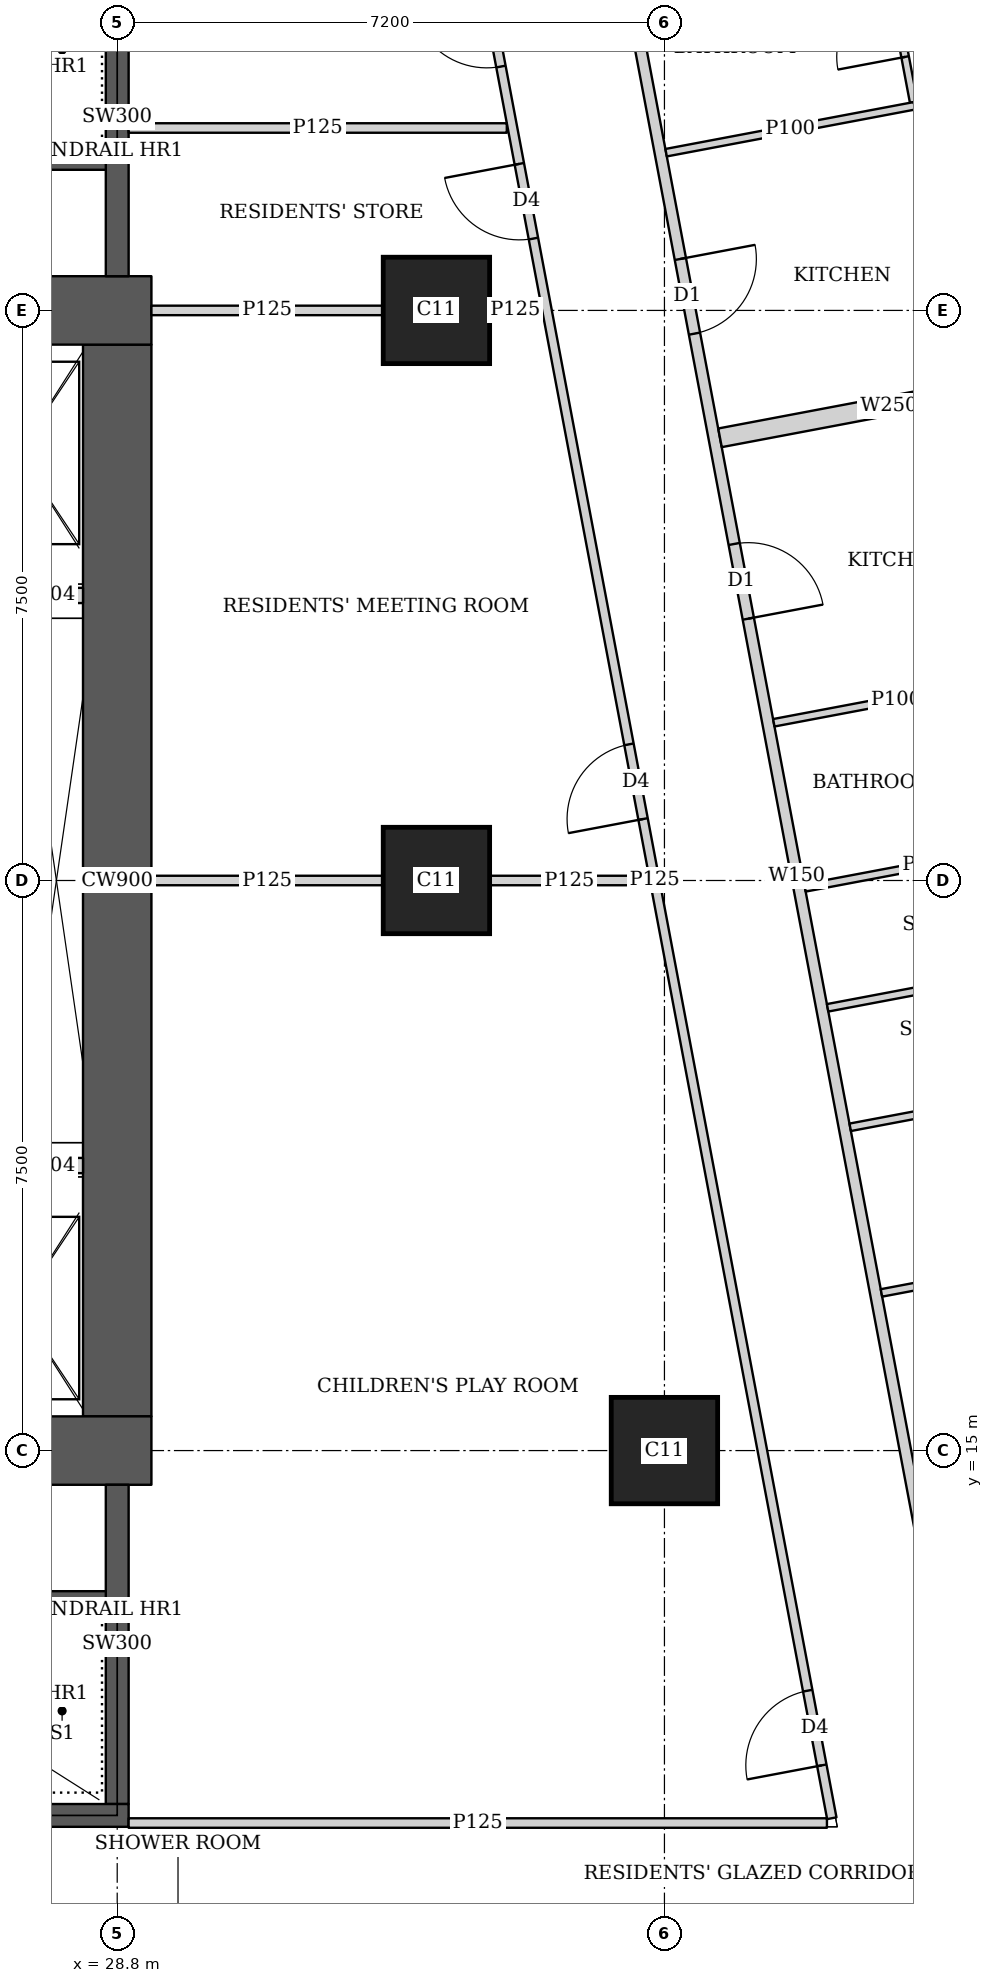
"""IFC4 building model, lengths in metres.
Left out: names, types, materials, properties, quantities, classifications, styles, units other than length and angle.
Written with IfcOpenShell. Run it as: python <this file> out.ifc"""

import sys

from ifc_helpers import new_model, si_unit, direction, frame, frame_2d, origin, origin_2d, place, context, subcontext, project, spatial, rectangle, extrude, element, fill, save


model = new_model("IFC4")
c1 = context("Model", 3, precision=1e-05, world=origin(), true_north=direction((0.0, 1.0)))
c2 = subcontext(c1, "Body", "Model", "MODEL_VIEW")
j1 = project(units=[si_unit("LENGTHUNIT", "METRE"), si_unit("PLANEANGLEUNIT", "RADIAN")], contexts=[c1])
p1 = place(None, origin())
s1 = spatial("IfcSite", under=j1, at=p1, CompositionType="ELEMENT")
p2 = place(p1, origin())
s2 = spatial("IfcBuilding", under=s1, at=p2, CompositionType="ELEMENT")
p3 = place(p2, frame((0.0, 0.0, 242.45)))
s3 = spatial("IfcBuildingStorey", under=s2, at=p3, CompositionType="ELEMENT", Elevation=242.45)
for number, where, z_axis, x_axis in (
    (1, (36.0, 15.0, 0.0), (0.0, 0.0, 1.0), (1.0, 0.0, 0.0)),
    (2, (33.0, 22.5, 0.0), (0.0, 0.0, 1.0), (1.0, 0.0, 0.0)),
    (3, (33.0, 30.0, 0.0), (0.0, 0.0, 1.0), (1.0, 0.0, 0.0)),
):
    element("IfcColumn", number, at=place(p3, frame(where, z_axis=z_axis, x_axis=x_axis)), inside=s3, PredefinedType="COLUMN", context=c2, shape_type="SweptSolid", body=[
        extrude(rectangle(XDim=1.4, YDim=1.4, at=origin_2d()), origin(), (0.0, 0.0, 1.0), 3.75),
    ])
p4 = place(p3, frame((13.95, 15.0, 0.0), z_axis=(0.0, 0.0, 1.0), x_axis=(1.0, 0.0, 0.0)))
e4 = element("IfcWall", 4, at=p4, inside=s3, PredefinedType="SHEAR", context=c2, shape_type="SweptSolid", body=[
    extrude(rectangle(XDim=15.3, YDim=0.9, at=frame_2d((7.65, 0.0))), origin(), (0.0, 0.0, 1.0), 3.75),
])
p5 = place(p4, frame((4.45, 0.0, 0.0)))
e5 = element("IfcOpeningElement", 5, at=p5, cuts=e4, PredefinedType="OPENING", context=c2, shape_type="SweptSolid", body=[
    extrude(rectangle(XDim=1.8, YDim=2.1, at=frame_2d((0.9, 1.05))), frame((0.0, 0.46, 0.0), z_axis=(0.0, -1.0, 0.0), x_axis=(1.0, 0.0, 0.0)), (0.0, 0.0, 1.0), 0.92),
])
p6 = place(p4, frame((10.7, 0.0, 0.0)))
e6 = element("IfcOpeningElement", 6, at=p6, cuts=e4, PredefinedType="OPENING", context=c2, shape_type="SweptSolid", body=[
    extrude(rectangle(XDim=1.1, YDim=2.1, at=frame_2d((0.55, 1.05))), frame((0.0, 0.46, 0.0), z_axis=(0.0, -1.0, 0.0), x_axis=(1.0, 0.0, 0.0)), (0.0, 0.0, 1.0), 0.92),
])
p7 = place(p3, frame((13.95, 30.0, 0.0), z_axis=(0.0, 0.0, 1.0), x_axis=(1.0, 0.0, 0.0)))
e7 = element("IfcWall", 7, at=p7, inside=s3, PredefinedType="SHEAR", context=c2, shape_type="SweptSolid", body=[
    extrude(rectangle(XDim=15.3, YDim=0.9, at=frame_2d((7.65, 0.0))), origin(), (0.0, 0.0, 1.0), 3.75),
])
p8 = place(p7, frame((4.45, 0.0, 0.0)))
e8 = element("IfcOpeningElement", 8, at=p8, cuts=e7, PredefinedType="OPENING", context=c2, shape_type="SweptSolid", body=[
    extrude(rectangle(XDim=1.8, YDim=2.1, at=frame_2d((0.9, 1.05))), frame((0.0, 0.46, 0.0), z_axis=(0.0, -1.0, 0.0), x_axis=(1.0, 0.0, 0.0)), (0.0, 0.0, 1.0), 0.92),
])
p9 = place(p7, frame((10.7, 0.0, 0.0)))
e9 = element("IfcOpeningElement", 9, at=p9, cuts=e7, PredefinedType="OPENING", context=c2, shape_type="SweptSolid", body=[
    extrude(rectangle(XDim=1.1, YDim=2.1, at=frame_2d((0.55, 1.05))), frame((0.0, 0.46, 0.0), z_axis=(0.0, -1.0, 0.0), x_axis=(1.0, 0.0, 0.0)), (0.0, 0.0, 1.0), 0.92),
])
p10 = place(p3, frame((28.8, 15.45, 0.0), z_axis=(0.0, 0.0, 1.0), x_axis=(0.0, 1.0, 0.0)))
e10 = element("IfcWall", 10, at=p10, inside=s3, PredefinedType="SHEAR", context=c2, shape_type="SweptSolid", body=[
    extrude(rectangle(XDim=14.1, YDim=0.9, at=frame_2d((7.05, 0.0))), origin(), (0.0, 0.0, 1.0), 3.75),
])
p11 = place(p3, frame((21.45, 10.2, 0.0), z_axis=(0.0, 0.0, 1.0), x_axis=(1.0, 0.0, 0.0)))
e11 = element("IfcWall", 11, at=p11, inside=s3, PredefinedType="SHEAR", context=c2, shape_type="SweptSolid", body=[
    extrude(rectangle(XDim=7.5, YDim=0.3, at=frame_2d((3.75, 0.0))), origin(), (0.0, 0.0, 1.0), 3.75),
])
p12 = place(p11, frame((0.5, 0.0, 0.0)))
e12 = element("IfcOpeningElement", 12, at=p12, cuts=e11, PredefinedType="OPENING", context=c2, shape_type="SweptSolid", body=[
    extrude(rectangle(XDim=1.1, YDim=2.1, at=frame_2d((0.55, 1.05))), frame((0.0, 0.16, 0.0), z_axis=(0.0, -1.0, 0.0), x_axis=(1.0, 0.0, 0.0)), (0.0, 0.0, 1.0), 0.32),
])
for number, where, z_axis, x_axis in (
    (13, (28.8, 10.35, 0.0), (0.0, 0.0, 1.0), (0.0, 1.0, 0.0)),
    (14, (28.8, 30.45, 0.0), (0.0, 0.0, 1.0), (0.0, 1.0, 0.0)),
):
    element("IfcWall", number, at=place(p3, frame(where, z_axis=z_axis, x_axis=x_axis)), inside=s3, PredefinedType="SHEAR", context=c2, shape_type="SweptSolid", body=[
        extrude(rectangle(XDim=4.2, YDim=0.3, at=frame_2d((2.1, 0.0))), origin(), (0.0, 0.0, 1.0), 3.75),
    ])
p13 = place(p3, frame((33.933, 42.73, 0.0), z_axis=(0.0, 0.0, 1.0), x_axis=(0.185595417643, -0.982626246825, 0.0)))
e15 = element("IfcWall", 15, at=p13, inside=s3, PredefinedType="SOLIDWALL", context=c2, shape_type="SweptSolid", body=[
    extrude(rectangle(XDim=41.051, YDim=0.15, at=frame_2d((20.525, 0.0))), origin(), (0.0, 0.0, 1.0), 2.45),
])
p14 = place(p13, frame((12.266, 0.0, 0.0)))
e16 = element("IfcOpeningElement", 16, at=p14, cuts=e15, PredefinedType="OPENING", context=c2, shape_type="SweptSolid", body=[
    extrude(rectangle(XDim=1.0, YDim=2.1, at=frame_2d((0.5, 1.05))), frame((0.0, 0.085, 0.0), z_axis=(0.0, -1.0, 0.0), x_axis=(1.0, 0.0, 0.0)), (0.0, 0.0, 1.0), 0.17),
])
p15 = place(p13, frame((16.082, 0.0, 0.0)))
e17 = element("IfcOpeningElement", 17, at=p15, cuts=e15, PredefinedType="OPENING", context=c2, shape_type="SweptSolid", body=[
    extrude(rectangle(XDim=1.0, YDim=2.1, at=frame_2d((0.5, 1.05))), frame((0.0, 0.085, 0.0), z_axis=(0.0, -1.0, 0.0), x_axis=(1.0, 0.0, 0.0)), (0.0, 0.0, 1.0), 0.17),
])
p16 = place(p13, frame((30.862, 0.0, 0.0)))
e18 = element("IfcOpeningElement", 18, at=p16, cuts=e15, PredefinedType="OPENING", context=c2, shape_type="SweptSolid", body=[
    extrude(rectangle(XDim=1.0, YDim=2.1, at=frame_2d((0.5, 1.05))), frame((0.0, 0.085, 0.0), z_axis=(0.0, -1.0, 0.0), x_axis=(1.0, 0.0, 0.0)), (0.0, 0.0, 1.0), 0.17),
])
p17 = place(p3, frame((38.764, 41.941, 0.0), z_axis=(0.0, 0.0, 1.0), x_axis=(0.185548572312, -0.982635093671, 0.0)))
e19 = element("IfcWall", 19, at=p17, inside=s3, PredefinedType="PARTITIONING", context=c2, shape_type="SweptSolid", body=[
    extrude(rectangle(XDim=9.135, YDim=0.1, at=frame_2d((4.568, 0.0))), origin(), (0.0, 0.0, 1.0), 3.45),
])
p18 = place(p17, frame((8.085, 0.0, 0.0)))
e20 = element("IfcOpeningElement", 20, at=p18, cuts=e19, PredefinedType="OPENING", context=c2, shape_type="SweptSolid", body=[
    extrude(rectangle(XDim=0.9, YDim=2.1, at=frame_2d((0.45, 1.05))), frame((0.0, 0.06, 0.0), z_axis=(0.0, -1.0, 0.0), x_axis=(1.0, 0.0, 0.0)), (0.0, 0.0, 1.0), 0.12),
])
p19 = place(p17, frame((3.7, 0.0, 0.0)))
e21 = element("IfcOpeningElement", 21, at=p19, cuts=e19, PredefinedType="OPENING", context=c2, shape_type="SweptSolid", body=[
    extrude(rectangle(XDim=0.9, YDim=2.1, at=frame_2d((0.45, 1.05))), frame((0.0, 0.06, 0.0), z_axis=(0.0, -1.0, 0.0), x_axis=(1.0, 0.0, 0.0)), (0.0, 0.0, 1.0), 0.12),
])
p20 = place(p3, frame((37.473, 42.309, 0.0), z_axis=(0.0, 0.0, 1.0), x_axis=(0.185491912953, -0.982645790827, 0.0)))
e22 = element("IfcWall", 22, at=p20, inside=s3, PredefinedType="PARTITIONING", context=c2, shape_type="SweptSolid", body=[
    extrude(rectangle(XDim=9.737, YDim=0.1, at=frame_2d((4.869, 0.0))), origin(), (0.0, 0.0, 1.0), 3.45),
])
p21 = place(p20, frame((8.232, 0.0, 0.0)))
e23 = element("IfcOpeningElement", 23, at=p21, cuts=e22, PredefinedType="OPENING", context=c2, shape_type="SweptSolid", body=[
    extrude(rectangle(XDim=0.9, YDim=2.1, at=frame_2d((0.45, 1.05))), frame((0.0, 0.06, 0.0), z_axis=(0.0, -1.0, 0.0), x_axis=(1.0, 0.0, 0.0)), (0.0, 0.0, 1.0), 0.12),
])
p22 = place(p20, frame((2.853, 0.0, 0.0)))
e24 = element("IfcOpeningElement", 24, at=p22, cuts=e22, PredefinedType="OPENING", context=c2, shape_type="SweptSolid", body=[
    extrude(rectangle(XDim=0.9, YDim=2.1, at=frame_2d((0.45, 1.05))), frame((0.0, 0.06, 0.0), z_axis=(0.0, -1.0, 0.0), x_axis=(1.0, 0.0, 0.0)), (0.0, 0.0, 1.0), 0.12),
])
p23 = place(p20, frame((5.564, 0.0, 0.0)))
e25 = element("IfcOpeningElement", 25, at=p23, cuts=e22, PredefinedType="OPENING", context=c2, shape_type="SweptSolid", body=[
    extrude(rectangle(XDim=0.9, YDim=2.1, at=frame_2d((0.45, 1.05))), frame((0.0, 0.06, 0.0), z_axis=(0.0, -1.0, 0.0), x_axis=(1.0, 0.0, 0.0)), (0.0, 0.0, 1.0), 0.12),
])
p24 = place(p3, frame((39.289, 32.692, 0.0), z_axis=(0.0, 0.0, 1.0), x_axis=(-0.982633623707, -0.185556356831, 0.0)))
e26 = element("IfcWall", 26, at=p24, inside=s3, PredefinedType="PARTITIONING", context=c2, shape_type="SweptSolid", body=[
    extrude(rectangle(XDim=3.325, YDim=0.1, at=frame_2d((1.663, 0.0))), origin(), (0.0, 0.0, 1.0), 3.45),
])
for number, where, z_axis, x_axis in (
    (27, (40.657, 25.183, 0.0), (0.0, 0.0, 1.0), (-0.983, -0.186, 0.0)),
    (28, (41.365, 21.433, 0.0), (0.0, 0.0, 1.0), (-0.983, -0.186, 0.0)),
):
    element("IfcWall", number, at=place(p3, frame(where, z_axis=z_axis, x_axis=x_axis)), inside=s3, PredefinedType="PARTITIONING", context=c2, shape_type="SweptSolid", body=[
        extrude(rectangle(XDim=3.275, YDim=0.1, at=frame_2d((1.637, 0.0))), origin(), (0.0, 0.0, 1.0), 3.45),
    ])
p25 = place(p3, frame((42.073, 17.682, 0.0), z_axis=(0.0, 0.0, 1.0), x_axis=(-0.982620626894, -0.185625169636, 0.0)))
e29 = element("IfcWall", 29, at=p25, inside=s3, PredefinedType="PARTITIONING", context=c2, shape_type="SweptSolid", body=[
    extrude(rectangle(XDim=3.275, YDim=0.1, at=frame_2d((1.637, 0.0))), origin(), (0.0, 0.0, 1.0), 3.45),
])
p26 = place(p25, frame((1.2, 0.0, 0.0)))
e30 = element("IfcOpeningElement", 30, at=p26, cuts=e29, PredefinedType="OPENING", context=c2, shape_type="SweptSolid", body=[
    extrude(rectangle(XDim=0.9, YDim=2.1, at=frame_2d((0.45, 1.05))), frame((0.0, 0.06, 0.0), z_axis=(0.0, -1.0, 0.0), x_axis=(1.0, 0.0, 0.0)), (0.0, 0.0, 1.0), 0.12),
])
p27 = place(p3, frame((41.067, 23.011, 0.0), z_axis=(0.0, 0.0, 1.0), x_axis=(-0.982618057925, -0.185638768151, 0.0)))
e31 = element("IfcWall", 31, at=p27, inside=s3, PredefinedType="PARTITIONING", context=c2, shape_type="SweptSolid", body=[
    extrude(rectangle(XDim=3.275, YDim=0.1, at=frame_2d((1.637, 0.0))), origin(), (0.0, 0.0, 1.0), 2.45),
])
p28 = place(p3, frame((41.662, 19.861, 0.0), z_axis=(0.0, 0.0, 1.0), x_axis=(-0.982607026909, -0.185697147715, 0.0)))
e32 = element("IfcWall", 32, at=p28, inside=s3, PredefinedType="PARTITIONING", context=c2, shape_type="SweptSolid", body=[
    extrude(rectangle(XDim=3.275, YDim=0.1, at=frame_2d((1.637, 0.0))), origin(), (0.0, 0.0, 1.0), 3.45),
])
p29 = place(p3, frame((41.177, 29.164, 0.0), z_axis=(0.0, 0.0, 1.0), x_axis=(-0.982612837616, -0.185666398014, 0.0)))
e33 = element("IfcWall", 33, at=p29, inside=s3, PredefinedType="SOLIDWALL", context=c2, shape_type="SweptSolid", body=[
    extrude(rectangle(XDim=4.525, YDim=0.25, at=frame_2d((2.262, 0.0))), origin(), (0.0, 0.0, 1.0), 2.45),
])
p30 = place(p3, frame((28.95, 10.1, 0.0), z_axis=(0.0, 0.0, 1.0), x_axis=(1.0, 0.0, 0.0)))
e34 = element("IfcWall", 34, at=p30, inside=s3, PredefinedType="PARTITIONING", context=c2, shape_type="SweptSolid", body=[
    extrude(rectangle(XDim=9.188, YDim=0.125, at=frame_2d((4.594, 0.0))), origin(), (0.0, 0.0, 1.0), 3.45),
])
p31 = place(p3, frame((38.202, 10.163, 0.0), z_axis=(0.0, 0.0, 1.0), x_axis=(-0.185610321132, 0.982623431783, 0.0)))
e35 = element("IfcWall", 35, at=p31, inside=s3, PredefinedType="PARTITIONING", context=c2, shape_type="SweptSolid", body=[
    extrude(rectangle(XDim=25.111, YDim=0.125, at=frame_2d((12.556, 0.0))), origin(), (0.0, 0.0, 1.0), 2.45),
])
p32 = place(p31, frame((0.708, 0.0, 0.0)))
e36 = element("IfcOpeningElement", 36, at=p32, cuts=e35, PredefinedType="OPENING", context=c2, shape_type="SweptSolid", body=[
    extrude(rectangle(XDim=1.0, YDim=2.1, at=frame_2d((0.5, 1.05))), frame((0.0, 0.073, 0.0), z_axis=(0.0, -1.0, 0.0), x_axis=(1.0, 0.0, 0.0)), (0.0, 0.0, 1.0), 0.145),
])
p33 = place(p31, frame((13.378, 0.0, 0.0)))
e37 = element("IfcOpeningElement", 37, at=p33, cuts=e35, PredefinedType="OPENING", context=c2, shape_type="SweptSolid", body=[
    extrude(rectangle(XDim=1.0, YDim=2.1, at=frame_2d((0.5, 1.05))), frame((0.0, 0.073, 0.0), z_axis=(0.0, -1.0, 0.0), x_axis=(1.0, 0.0, 0.0)), (0.0, 0.0, 1.0), 0.145),
])
p34 = place(p31, frame((21.15, 0.0, 0.0)))
e38 = element("IfcOpeningElement", 38, at=p34, cuts=e35, PredefinedType="OPENING", context=c2, shape_type="SweptSolid", body=[
    extrude(rectangle(XDim=1.0, YDim=2.1, at=frame_2d((0.5, 1.05))), frame((0.0, 0.073, 0.0), z_axis=(0.0, -1.0, 0.0), x_axis=(1.0, 0.0, 0.0)), (0.0, 0.0, 1.0), 0.145),
])
p35 = place(p31, frame((23.453, 0.0, 0.0)))
e39 = element("IfcOpeningElement", 39, at=p35, cuts=e35, PredefinedType="OPENING", context=c2, shape_type="SweptSolid", body=[
    extrude(rectangle(XDim=1.0, YDim=2.1, at=frame_2d((0.5, 1.05))), frame((0.0, 0.073, 0.0), z_axis=(0.0, -1.0, 0.0), x_axis=(1.0, 0.0, 0.0)), (0.0, 0.0, 1.0), 0.145),
])
p36 = place(p3, frame((29.25, 22.5, 0.0), z_axis=(0.0, 0.0, 1.0), x_axis=(1.0, 0.0, 0.0)))
e40 = element("IfcWall", 40, at=p36, inside=s3, PredefinedType="PARTITIONING", context=c2, shape_type="SweptSolid", body=[
    extrude(rectangle(XDim=3.049, YDim=0.125, at=frame_2d((1.524, 0.0))), origin(), (0.0, 0.0, 1.0), 3.45),
])
p37 = place(p3, frame((33.701, 22.5, 0.0), z_axis=(0.0, 0.0, 1.0), x_axis=(1.0, 0.0, 0.0)))
e41 = element("IfcWall", 41, at=p37, inside=s3, PredefinedType="PARTITIONING", context=c2, shape_type="SweptSolid", body=[
    extrude(rectangle(XDim=2.095, YDim=0.125, at=frame_2d((1.047, 0.0))), origin(), (0.0, 0.0, 1.0), 2.45),
])
p38 = place(p3, frame((29.25, 30.0, 0.0), z_axis=(0.0, 0.0, 1.0), x_axis=(1.0, 0.0, 0.0)))
e42 = element("IfcWall", 42, at=p38, inside=s3, PredefinedType="PARTITIONING", context=c2, shape_type="SweptSolid", body=[
    extrude(rectangle(XDim=3.049, YDim=0.125, at=frame_2d((1.524, 0.0))), origin(), (0.0, 0.0, 1.0), 3.45),
])
p39 = place(p3, frame((33.701, 30.0, 0.0), z_axis=(0.0, 0.0, 1.0), x_axis=(1.0, 0.0, 0.0)))
e43 = element("IfcWall", 43, at=p39, inside=s3, PredefinedType="PARTITIONING", context=c2, shape_type="SweptSolid", body=[
    extrude(rectangle(XDim=0.678, YDim=0.125, at=frame_2d((0.339, 0.0))), origin(), (0.0, 0.0, 1.0), 2.45),
])
p40 = place(p3, frame((28.95, 32.4, 0.0), z_axis=(0.0, 0.0, 1.0), x_axis=(1.0, 0.0, 0.0)))
e44 = element("IfcWall", 44, at=p40, inside=s3, PredefinedType="PARTITIONING", context=c2, shape_type="SweptSolid", body=[
    extrude(rectangle(XDim=4.976, YDim=0.125, at=frame_2d((2.488, 0.0))), origin(), (0.0, 0.0, 1.0), 3.45),
])
for number, where, z_axis, x_axis in (
    (45, (23.0, 13.05, 0.0), (0.0, 0.0, 1.0), (1.0, 0.0, 0.0)),
    (46, (23.0, 31.95, 0.0), (0.0, 0.0, 1.0), (1.0, 0.0, 0.0)),
):
    element("IfcWall", number, at=place(p3, frame(where, z_axis=z_axis, x_axis=x_axis)), inside=s3, PredefinedType="SHEAR", context=c2, shape_type="SweptSolid", body=[
        extrude(rectangle(XDim=5.8, YDim=0.2, at=frame_2d((2.9, 0.0))), origin(), (0.0, 0.0, 1.0), 3.75),
    ])
for number, where, z_axis, x_axis in (
    (47, (27.4, 18.75, 0.0), (0.0, 0.0, 1.0), (1.0, 0.0, 0.0)),
    (48, (27.4, 26.25, 0.0), (0.0, 0.0, 1.0), (1.0, 0.0, 0.0)),
):
    element("IfcWall", number, at=place(p3, frame(where, z_axis=z_axis, x_axis=x_axis)), inside=s3, PredefinedType="SOLIDWALL", context=c2, shape_type="SweptSolid", body=[
        extrude(rectangle(XDim=0.95, YDim=0.2, at=frame_2d((0.475, 0.0))), origin(), (0.0, 0.0, 1.0), 3.45),
    ])
p41 = place(p21, origin())
e49 = element("IfcDoor", 49, at=p41, inside=s3, OperationType="SINGLE_SWING_LEFT", PredefinedType="DOOR", context=c2, shape_type="SweptSolid", body=[
    extrude(rectangle(XDim=0.9, YDim=2.1, at=frame_2d((0.45, 1.05))), frame((0.0, 0.025, 0.0), z_axis=(0.0, -1.0, 0.0), x_axis=(1.0, 0.0, 0.0)), (0.0, 0.0, 1.0), 0.05),
])
fill(e23, e49)
p42 = place(p14, origin())
e50 = element("IfcDoor", 50, at=p42, inside=s3, OperationType="SINGLE_SWING_LEFT", PredefinedType="DOOR", context=c2, shape_type="SweptSolid", body=[
    extrude(rectangle(XDim=1.0, YDim=2.1, at=frame_2d((0.5, 1.05))), frame((0.0, 0.025, 0.0), z_axis=(0.0, -1.0, 0.0), x_axis=(1.0, 0.0, 0.0)), (0.0, 0.0, 1.0), 0.05),
])
fill(e16, e50)
p43 = place(p15, origin())
e51 = element("IfcDoor", 51, at=p43, inside=s3, OperationType="SINGLE_SWING_RIGHT", PredefinedType="DOOR", context=c2, shape_type="SweptSolid", body=[
    extrude(rectangle(XDim=1.0, YDim=2.1, at=frame_2d((0.5, 1.05))), frame((0.0, 0.025, 0.0), z_axis=(0.0, -1.0, 0.0), x_axis=(1.0, 0.0, 0.0)), (0.0, 0.0, 1.0), 0.05),
])
fill(e17, e51)
p44 = place(p32, origin())
e52 = element("IfcDoor", 52, at=p44, inside=s3, OperationType="SINGLE_SWING_LEFT", PredefinedType="DOOR", context=c2, shape_type="SweptSolid", body=[
    extrude(rectangle(XDim=1.0, YDim=2.1, at=frame_2d((0.5, 1.05))), frame((0.0, 0.025, 0.0), z_axis=(0.0, -1.0, 0.0), x_axis=(1.0, 0.0, 0.0)), (0.0, 0.0, 1.0), 0.05),
])
fill(e36, e52)
p45 = place(p33, origin())
e53 = element("IfcDoor", 53, at=p45, inside=s3, OperationType="SINGLE_SWING_LEFT", PredefinedType="DOOR", context=c2, shape_type="SweptSolid", body=[
    extrude(rectangle(XDim=1.0, YDim=2.1, at=frame_2d((0.5, 1.05))), frame((0.0, 0.025, 0.0), z_axis=(0.0, -1.0, 0.0), x_axis=(1.0, 0.0, 0.0)), (0.0, 0.0, 1.0), 0.05),
])
fill(e37, e53)
p46 = place(p34, origin())
e54 = element("IfcDoor", 54, at=p46, inside=s3, OperationType="SINGLE_SWING_RIGHT", PredefinedType="DOOR", context=c2, shape_type="SweptSolid", body=[
    extrude(rectangle(XDim=1.0, YDim=2.1, at=frame_2d((0.5, 1.05))), frame((0.0, 0.025, 0.0), z_axis=(0.0, -1.0, 0.0), x_axis=(1.0, 0.0, 0.0)), (0.0, 0.0, 1.0), 0.05),
])
fill(e38, e54)
p47 = place(p35, origin())
e55 = element("IfcDoor", 55, at=p47, inside=s3, OperationType="SINGLE_SWING_RIGHT", PredefinedType="DOOR", context=c2, shape_type="SweptSolid", body=[
    extrude(rectangle(XDim=1.0, YDim=2.1, at=frame_2d((0.5, 1.05))), frame((0.0, 0.025, 0.0), z_axis=(0.0, -1.0, 0.0), x_axis=(1.0, 0.0, 0.0)), (0.0, 0.0, 1.0), 0.05),
])
fill(e39, e55)
save(model, sys.argv[1])
